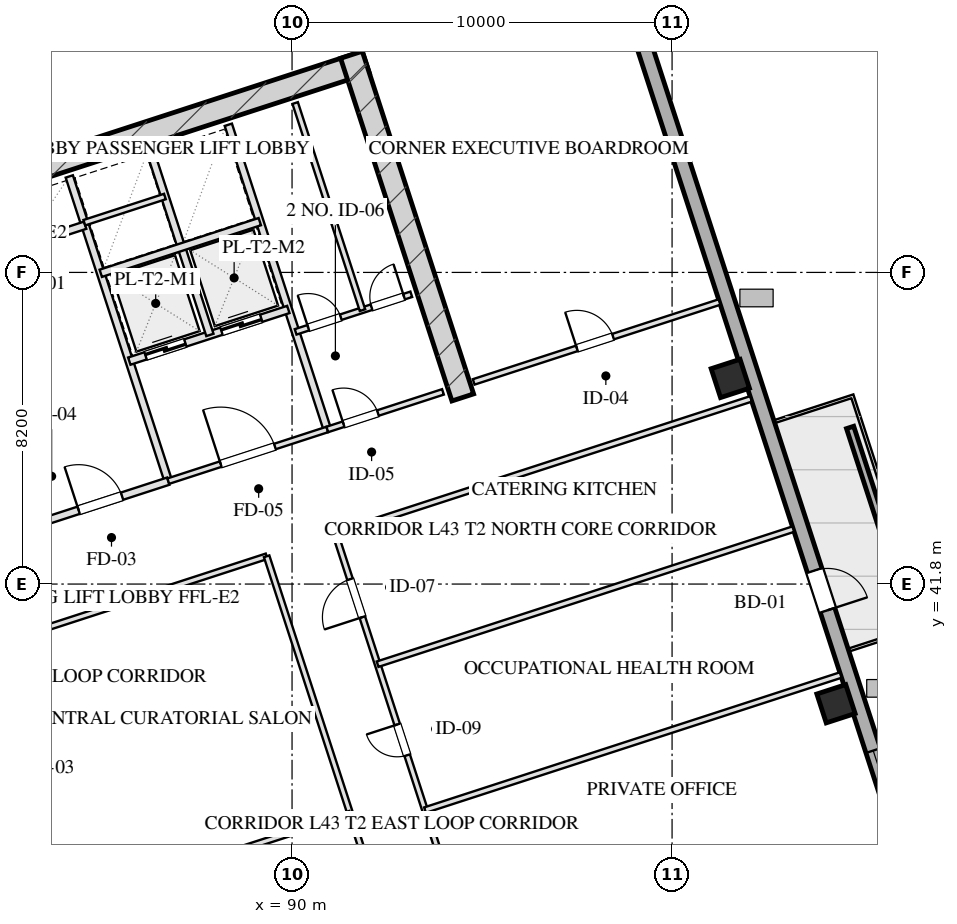
"""IFC4 building model, lengths in metres.
Left out: names, types, materials, properties, quantities, classifications, styles, units other than length and angle.
Written with IfcOpenShell. Run it as: python <this file> out.ifc"""

import sys

from ifc_helpers import new_model, si_unit, direction, frame, frame_2d, origin, origin_2d, place, context, subcontext, project, spatial, rectangle, hollow_rectangle, extrude, element, fill, save


model = new_model("IFC4")
c1 = context("Model", 3, precision=1e-05, world=origin(), true_north=direction((0.0, 1.0)))
c2 = subcontext(c1, "Body", "Model", "MODEL_VIEW")
j1 = project(units=[si_unit("LENGTHUNIT", "METRE"), si_unit("PLANEANGLEUNIT", "RADIAN")], contexts=[c1])
p1 = place(None, origin())
s1 = spatial("IfcSite", under=j1, at=p1, CompositionType="ELEMENT")
p2 = place(p1, origin())
s2 = spatial("IfcBuilding", under=s1, at=p2, CompositionType="ELEMENT")
p3 = place(p2, frame((0.0, 0.0, 163.3)))
s3 = spatial("IfcBuildingStorey", under=s2, at=p3, CompositionType="ELEMENT", Elevation=163.3)
p4 = place(p3, frame((76.344, 50.466, 0.0), z_axis=(0.0, 0.0, 1.0), x_axis=(0.951055727519, 0.309019421968, 0.0)))
e1 = element("IfcWall", 1, at=p4, inside=s3, PredefinedType="SHEAR", context=c2, shape_type="SweptSolid", body=[
    extrude(rectangle(XDim=16.4, YDim=0.6, at=frame_2d((8.2, 0.0))), origin(), (0.0, 0.0, 1.0), 3.45),
])
p5 = place(p3, frame((94.492, 46.71, 0.0), z_axis=(0.0, 0.0, 1.0), x_axis=(-0.309010370028, 0.95105866865, 0.0)))
e2 = element("IfcWall", 2, at=p5, inside=s3, PredefinedType="SHEAR", context=c2, shape_type="SweptSolid", body=[
    extrude(rectangle(XDim=9.48, YDim=0.6, at=frame_2d((4.74, 0.0))), origin(), (0.0, 0.0, 1.0), 3.45),
])
for number, where, z_axis, x_axis in (
    (3, (104.313, 38.651, 0.0), (0.0, 0.0, 1.0), (0.951, 0.309, 0.0)),
    (4, (101.532, 47.21, 0.0), (0.0, 0.0, 1.0), (0.951, 0.309, 0.0)),
):
    element("IfcColumn", number, at=place(p3, frame(where, z_axis=z_axis, x_axis=x_axis)), inside=s3, PredefinedType="COLUMN", context=c2, shape_type="SweptSolid", body=[
        extrude(hollow_rectangle(XDim=0.8, YDim=0.8, WallThickness=0.028, at=origin_2d()), origin(), (0.0, 0.0, 1.0), 3.451),
    ])
p6 = place(p3, frame((70.092, 52.556, 0.0), z_axis=(0.0, 0.0, 1.0), x_axis=(0.951057580055, 0.30901372044, 0.0)))
e5 = element("IfcWall", 5, at=p6, inside=s3, PredefinedType="SOLIDWALL", context=c2, shape_type="SweptSolid", body=[
    extrude(rectangle(XDim=26.4, YDim=0.4, at=frame_2d((13.2, 0.0))), origin(), (0.0, 0.0, 1.0), 2.61),
])
p7 = place(p3, frame((98.224, 59.173, 0.0), z_axis=(0.0, 0.0, 1.0), x_axis=(0.309014228706, -0.951057414911, 0.0)))
e6 = element("IfcWall", 6, at=p7, inside=s3, PredefinedType="SOLIDWALL", context=c2, shape_type="SweptSolid", body=[
    extrude(rectangle(XDim=42.8, YDim=0.4, at=frame_2d((21.4, 0.0))), origin(), (0.0, 0.0, 1.0), 2.61),
])
p8 = place(p7, frame((26.675, 0.0, 0.75)))
e7 = element("IfcOpeningElement", 7, at=p8, cuts=e6, PredefinedType="OPENING", context=c2, shape_type="SweptSolid", body=[
    extrude(rectangle(XDim=2.25, YDim=1.46, at=frame_2d((1.125, 0.73))), frame((0.0, 0.21, 0.0), z_axis=(0.0, -1.0, 0.0), x_axis=(1.0, 0.0, 0.0)), (0.0, 0.0, 1.0), 0.42),
])
p9 = place(p7, frame((22.875, 0.0, 0.75)))
e8 = element("IfcOpeningElement", 8, at=p9, cuts=e6, PredefinedType="OPENING", context=c2, shape_type="SweptSolid", body=[
    extrude(rectangle(XDim=2.25, YDim=1.46, at=frame_2d((1.125, 0.73))), frame((0.0, 0.21, 0.0), z_axis=(0.0, -1.0, 0.0), x_axis=(1.0, 0.0, 0.0)), (0.0, 0.0, 1.0), 0.42),
])
p10 = place(p7, frame((17.892, 0.0, 0.0)))
e9 = element("IfcOpeningElement", 9, at=p10, cuts=e6, PredefinedType="OPENING", context=c2, shape_type="SweptSolid", body=[
    extrude(rectangle(XDim=1.1, YDim=2.15, at=frame_2d((0.55, 1.075))), frame((0.0, 0.21, 0.0), z_axis=(0.0, -1.0, 0.0), x_axis=(1.0, 0.0, 0.0)), (0.0, 0.0, 1.0), 0.42),
])
p11 = place(p3, frame((106.168, 41.356, 0.0), z_axis=(0.0, 0.0, 1.0), x_axis=(-0.309032019345, 0.951051634255, 0.0)))
e10 = element("IfcWall", 10, at=p11, inside=s3, PredefinedType="PARAPET", context=c2, shape_type="SweptSolid", body=[
    extrude(rectangle(XDim=4.8, YDim=0.2, at=frame_2d((2.4, 0.0))), origin(), (0.0, 0.0, 1.0), 0.75),
])
p12 = place(p3, frame((86.743, 44.508, 0.0), z_axis=(0.0, 0.0, 1.0), x_axis=(-0.309016001439, 0.951056838919, 0.0)))
e11 = element("IfcWall", 11, at=p12, inside=s3, PredefinedType="PARTITIONING", context=c2, shape_type="SweptSolid", body=[
    extrude(rectangle(XDim=8.43, YDim=0.2, at=frame_2d((4.215, 0.0))), origin(), (0.0, 0.0, 1.0), 3.175),
])
p13 = place(p3, frame((83.101, 43.324, 0.0), z_axis=(0.0, 0.0, 1.0), x_axis=(0.951052804469, 0.309028417967, 0.0)))
e12 = element("IfcWall", 12, at=p13, inside=s3, PredefinedType="PARTITIONING", context=c2, shape_type="SweptSolid", body=[
    extrude(rectangle(XDim=3.83, YDim=0.2, at=frame_2d((1.915, 0.0))), origin(), (0.0, 0.0, 1.0), 3.175),
])
p14 = place(p13, frame((1.35, 0.0, 0.0)))
e13 = element("IfcOpeningElement", 13, at=p14, cuts=e12, PredefinedType="OPENING", context=c2, shape_type="SweptSolid", body=[
    extrude(rectangle(XDim=1.2, YDim=2.05, at=frame_2d((0.6, 1.025))), frame((0.0, 0.11, 0.0), z_axis=(0.0, -1.0, 0.0), x_axis=(1.0, 0.0, 0.0)), (0.0, 0.0, 1.0), 0.22),
])
p15 = place(p3, frame((82.91, 50.707, 0.0), z_axis=(0.0, 0.0, 1.0), x_axis=(0.951041328149, 0.309063734775, 0.0)))
e14 = element("IfcWall", 14, at=p15, inside=s3, PredefinedType="PARTITIONING", context=c2, shape_type="SweptSolid", body=[
    extrude(rectangle(XDim=1.73, YDim=0.2, at=frame_2d((0.865, 0.0))), origin(), (0.0, 0.0, 1.0), 3.175),
])
p16 = place(p3, frame((90.928, 45.868, 0.0), z_axis=(0.0, 0.0, 1.0), x_axis=(-0.309042196757, 0.951048327176, 0.0)))
e15 = element("IfcWall", 15, at=p16, inside=s3, PredefinedType="PARTITIONING", context=c2, shape_type="SweptSolid", body=[
    extrude(rectangle(XDim=8.43, YDim=0.2, at=frame_2d((4.215, 0.0))), origin(), (0.0, 0.0, 1.0), 3.175),
])
p17 = place(p3, frame((86.743, 44.508, 0.0), z_axis=(0.0, 0.0, 1.0), x_axis=(0.951063829732, 0.308994485023, 0.0)))
e16 = element("IfcWall", 16, at=p17, inside=s3, PredefinedType="PARTITIONING", context=c2, shape_type="SweptSolid", body=[
    extrude(rectangle(XDim=4.4, YDim=0.15, at=frame_2d((2.2, 0.0))), origin(), (0.0, 0.0, 1.0), 3.175),
])
p18 = place(p17, frame((1.45, 0.0, 0.0)))
e17 = element("IfcOpeningElement", 17, at=p18, cuts=e16, PredefinedType="OPENING", context=c2, shape_type="SweptSolid", body=[
    extrude(rectangle(XDim=1.5, YDim=2.05, at=frame_2d((0.75, 1.025))), frame((0.0, 0.085, 0.0), z_axis=(0.0, -1.0, 0.0), x_axis=(1.0, 0.0, 0.0)), (0.0, 0.0, 1.0), 0.17),
])
p19 = place(p3, frame((85.718, 47.666, 0.0), z_axis=(0.0, 0.0, 1.0), x_axis=(0.951058531764, 0.30901079133, 0.0)))
e18 = element("IfcWall", 18, at=p19, inside=s3, PredefinedType="PARTITIONING", context=c2, shape_type="SweptSolid", body=[
    extrude(rectangle(XDim=4.4, YDim=0.2, at=frame_2d((2.2, 0.0))), origin(), (0.0, 0.0, 1.0), 3.175),
])
p20 = place(p19, frame((0.45, 0.0, 0.0)))
e19 = element("IfcOpeningElement", 19, at=p20, cuts=e18, PredefinedType="OPENING", context=c2, shape_type="SweptSolid", body=[
    extrude(rectangle(XDim=1.1, YDim=2.05, at=frame_2d((0.55, 1.025))), frame((0.0, 0.11, 0.0), z_axis=(0.0, -1.0, 0.0), x_axis=(1.0, 0.0, 0.0)), (0.0, 0.0, 1.0), 0.22),
])
p21 = place(p19, frame((2.55, 0.0, 0.0)))
e20 = element("IfcOpeningElement", 20, at=p21, cuts=e18, PredefinedType="OPENING", context=c2, shape_type="SweptSolid", body=[
    extrude(rectangle(XDim=1.1, YDim=2.05, at=frame_2d((0.55, 1.025))), frame((0.0, 0.11, 0.0), z_axis=(0.0, -1.0, 0.0), x_axis=(1.0, 0.0, 0.0)), (0.0, 0.0, 1.0), 0.22),
])
p22 = place(p3, frame((87.838, 48.354, 0.0), z_axis=(0.0, 0.0, 1.0), x_axis=(-0.3090093719, 0.951058992953, 0.0)))
e21 = element("IfcWall", 21, at=p22, inside=s3, PredefinedType="PARTITIONING", context=c2, shape_type="SweptSolid", body=[
    extrude(rectangle(XDim=5.11, YDim=0.2, at=frame_2d((2.555, 0.0))), origin(), (0.0, 0.0, 1.0), 3.175),
])
p23 = place(p3, frame((84.967, 49.977, 0.0), z_axis=(0.0, 0.0, 1.0), x_axis=(0.951063829732, 0.308994485023, 0.0)))
e22 = element("IfcWall", 22, at=p23, inside=s3, PredefinedType="PARTITIONING", context=c2, shape_type="SweptSolid", body=[
    extrude(rectangle(XDim=4.4, YDim=0.2, at=frame_2d((2.2, 0.0))), origin(), (0.0, 0.0, 1.0), 3.175),
])
p24 = place(p3, frame((84.534, 51.308, 0.0), z_axis=(0.0, 0.0, 1.0), x_axis=(0.951075093106, 0.308959814982, 0.0)))
e23 = element("IfcWall", 23, at=p24, inside=s3, PredefinedType="PARTITIONING", context=c2, shape_type="SweptSolid", body=[
    extrude(rectangle(XDim=2.23, YDim=0.15, at=frame_2d((1.115, 0.0))), origin(), (0.0, 0.0, 1.0), 3.175),
])
p25 = place(p3, frame((90.928, 45.868, 0.0), z_axis=(0.0, 0.0, 1.0), x_axis=(0.951059297078, 0.309008435874, 0.0)))
e24 = element("IfcWall", 24, at=p25, inside=s3, PredefinedType="PARTITIONING", context=c2, shape_type="SweptSolid", body=[
    extrude(rectangle(XDim=3.2, YDim=0.15, at=frame_2d((1.6, 0.0))), origin(), (0.0, 0.0, 1.0), 3.175),
])
p26 = place(p25, frame((0.45, 0.0, 0.0)))
e25 = element("IfcOpeningElement", 25, at=p26, cuts=e24, PredefinedType="OPENING", context=c2, shape_type="SweptSolid", body=[
    extrude(rectangle(XDim=0.95, YDim=2.05, at=frame_2d((0.475, 1.025))), frame((0.0, 0.085, 0.0), z_axis=(0.0, -1.0, 0.0), x_axis=(1.0, 0.0, 0.0)), (0.0, 0.0, 1.0), 0.17),
])
p27 = place(p3, frame((90.094, 48.436, 0.0), z_axis=(0.0, 0.0, 1.0), x_axis=(0.951066581729, 0.308986014439, 0.0)))
e26 = element("IfcWall", 26, at=p27, inside=s3, PredefinedType="PARTITIONING", context=c2, shape_type="SweptSolid", body=[
    extrude(rectangle(XDim=3.2, YDim=0.15, at=frame_2d((1.6, 0.0))), origin(), (0.0, 0.0, 1.0), 3.175),
])
p28 = place(p27, frame((0.35, 0.0, 0.0)))
e27 = element("IfcOpeningElement", 27, at=p28, cuts=e26, PredefinedType="OPENING", context=c2, shape_type="SweptSolid", body=[
    extrude(rectangle(XDim=0.9, YDim=2.05, at=frame_2d((0.45, 1.025))), frame((0.0, 0.085, 0.0), z_axis=(0.0, -1.0, 0.0), x_axis=(1.0, 0.0, 0.0)), (0.0, 0.0, 1.0), 0.17),
])
p29 = place(p27, frame((2.1, 0.0, 0.0)))
e28 = element("IfcOpeningElement", 28, at=p29, cuts=e26, PredefinedType="OPENING", context=c2, shape_type="SweptSolid", body=[
    extrude(rectangle(XDim=0.9, YDim=2.05, at=frame_2d((0.45, 1.025))), frame((0.0, 0.085, 0.0), z_axis=(0.0, -1.0, 0.0), x_axis=(1.0, 0.0, 0.0)), (0.0, 0.0, 1.0), 0.17),
])
p30 = place(p3, frame((91.853, 49.007, 0.0), z_axis=(0.0, 0.0, 1.0), x_axis=(-0.309022487551, 0.951054731437, 0.0)))
e29 = element("IfcWall", 29, at=p30, inside=s3, PredefinedType="PARTITIONING", context=c2, shape_type="SweptSolid", body=[
    extrude(rectangle(XDim=5.73, YDim=0.15, at=frame_2d((2.865, 0.0))), origin(), (0.0, 0.0, 1.0), 3.175),
])
p31 = place(p3, frame((94.78, 47.119, 0.0), z_axis=(0.0, 0.0, 1.0), x_axis=(0.951057811516, 0.309013008068, 0.0)))
e30 = element("IfcWall", 30, at=p31, inside=s3, PredefinedType="PARTITIONING", context=c2, shape_type="SweptSolid", body=[
    extrude(rectangle(XDim=6.8, YDim=0.15, at=frame_2d((3.4, 0.0))), origin(), (0.0, 0.0, 1.0), 3.175),
])
p32 = place(p31, frame((2.856, 0.0, 0.0)))
e31 = element("IfcOpeningElement", 31, at=p32, cuts=e30, PredefinedType="OPENING", context=c2, shape_type="SweptSolid", body=[
    extrude(rectangle(XDim=1.0, YDim=2.05, at=frame_2d((0.5, 1.025))), frame((0.0, 0.085, 0.0), z_axis=(0.0, -1.0, 0.0), x_axis=(1.0, 0.0, 0.0)), (0.0, 0.0, 1.0), 0.17),
])
p33 = place(p3, frame((81.152, 39.873, 0.0), z_axis=(0.0, 0.0, 1.0), x_axis=(0.951057640494, 0.309013534425, 0.0)))
e32 = element("IfcWall", 32, at=p33, inside=s3, PredefinedType="PARTITIONING", context=c2, shape_type="SweptSolid", body=[
    extrude(rectangle(XDim=8.6, YDim=0.15, at=frame_2d((4.3, 0.0))), origin(), (0.0, 0.0, 1.0), 3.175),
])
p34 = place(p3, frame((91.138, 43.118, 0.0), z_axis=(0.0, 0.0, 1.0), x_axis=(0.951054972381, 0.309021746015, 0.0)))
e33 = element("IfcWall", 33, at=p34, inside=s3, PredefinedType="PARTITIONING", context=c2, shape_type="SweptSolid", body=[
    extrude(rectangle(XDim=11.5, YDim=0.15, at=frame_2d((5.75, 0.0))), origin(), (0.0, 0.0, 1.0), 3.175),
])
p35 = place(p3, frame((84.487, 23.46, 0.0), z_axis=(0.0, 0.0, 1.0), x_axis=(-0.30901773025, 0.951056277195, 0.0)))
e34 = element("IfcWall", 34, at=p35, inside=s3, PredefinedType="PARTITIONING", context=c2, shape_type="SweptSolid", body=[
    extrude(rectangle(XDim=16.64, YDim=0.15, at=frame_2d((8.32, 0.0))), origin(), (0.0, 0.0, 1.0), 3.175),
])
p36 = place(p35, frame((1.16, 0.0, 0.0)))
e35 = element("IfcOpeningElement", 35, at=p36, cuts=e34, PredefinedType="OPENING", context=c2, shape_type="SweptSolid", body=[
    extrude(rectangle(XDim=1.0, YDim=2.05, at=frame_2d((0.5, 1.025))), frame((0.0, 0.085, 0.0), z_axis=(0.0, -1.0, 0.0), x_axis=(1.0, 0.0, 0.0)), (0.0, 0.0, 1.0), 0.17),
])
p37 = place(p35, frame((4.72, 0.0, 0.0)))
e36 = element("IfcOpeningElement", 36, at=p37, cuts=e34, PredefinedType="OPENING", context=c2, shape_type="SweptSolid", body=[
    extrude(rectangle(XDim=1.0, YDim=2.05, at=frame_2d((0.5, 1.025))), frame((0.0, 0.085, 0.0), z_axis=(0.0, -1.0, 0.0), x_axis=(1.0, 0.0, 0.0)), (0.0, 0.0, 1.0), 0.17),
])
p38 = place(p35, frame((7.56, 0.0, 0.0)))
e37 = element("IfcOpeningElement", 37, at=p38, cuts=e34, PredefinedType="OPENING", context=c2, shape_type="SweptSolid", body=[
    extrude(rectangle(XDim=1.0, YDim=2.05, at=frame_2d((0.5, 1.025))), frame((0.0, 0.085, 0.0), z_axis=(0.0, -1.0, 0.0), x_axis=(1.0, 0.0, 0.0)), (0.0, 0.0, 1.0), 0.17),
])
p39 = place(p35, frame((10.16, 0.0, 0.0)))
e38 = element("IfcOpeningElement", 38, at=p39, cuts=e34, PredefinedType="OPENING", context=c2, shape_type="SweptSolid", body=[
    extrude(rectangle(XDim=1.05, YDim=2.05, at=frame_2d((0.525, 1.025))), frame((0.0, 0.085, 0.0), z_axis=(0.0, -1.0, 0.0), x_axis=(1.0, 0.0, 0.0)), (0.0, 0.0, 1.0), 0.17),
])
p40 = place(p35, frame((14.48, 0.0, 0.0)))
e39 = element("IfcOpeningElement", 39, at=p40, cuts=e34, PredefinedType="OPENING", context=c2, shape_type="SweptSolid", body=[
    extrude(rectangle(XDim=1.0, YDim=2.05, at=frame_2d((0.5, 1.025))), frame((0.0, 0.085, 0.0), z_axis=(0.0, -1.0, 0.0), x_axis=(1.0, 0.0, 0.0)), (0.0, 0.0, 1.0), 0.17),
])
p41 = place(p3, frame((86.294, 24.048, 0.0), z_axis=(0.0, 0.0, 1.0), x_axis=(-0.309004459387, 0.951060589068, 0.0)))
e40 = element("IfcWall", 40, at=p41, inside=s3, PredefinedType="PARTITIONING", context=c2, shape_type="SweptSolid", body=[
    extrude(rectangle(XDim=16.64, YDim=0.15, at=frame_2d((8.32, 0.0))), origin(), (0.0, 0.0, 1.0), 3.175),
])
p42 = place(p41, frame((4.284, 0.0, 0.0)))
e41 = element("IfcOpeningElement", 41, at=p42, cuts=e40, PredefinedType="OPENING", context=c2, shape_type="SweptSolid", body=[
    extrude(rectangle(XDim=1.1, YDim=2.05, at=frame_2d((0.55, 1.025))), frame((0.0, 0.085, 0.0), z_axis=(0.0, -1.0, 0.0), x_axis=(1.0, 0.0, 0.0)), (0.0, 0.0, 1.0), 0.17),
])
p43 = place(p41, frame((12.724, 0.0, 0.0)))
e42 = element("IfcOpeningElement", 42, at=p43, cuts=e40, PredefinedType="OPENING", context=c2, shape_type="SweptSolid", body=[
    extrude(rectangle(XDim=1.1, YDim=2.05, at=frame_2d((0.55, 1.025))), frame((0.0, 0.085, 0.0), z_axis=(0.0, -1.0, 0.0), x_axis=(1.0, 0.0, 0.0)), (0.0, 0.0, 1.0), 0.17),
])
p44 = place(p3, frame((94.473, 26.705, 0.0), z_axis=(0.0, 0.0, 1.0), x_axis=(-0.309022042254, 0.951054876125, 0.0)))
e43 = element("IfcWall", 43, at=p44, inside=s3, PredefinedType="PARTITIONING", context=c2, shape_type="SweptSolid", body=[
    extrude(rectangle(XDim=16.64, YDim=0.15, at=frame_2d((8.32, 0.0))), origin(), (0.0, 0.0, 1.0), 3.175),
])
p45 = place(p3, frame((96.28, 27.292, 0.0), z_axis=(0.0, 0.0, 1.0), x_axis=(-0.309008771245, 0.951059188113, 0.0)))
e44 = element("IfcWall", 44, at=p45, inside=s3, PredefinedType="PARTITIONING", context=c2, shape_type="SweptSolid", body=[
    extrude(rectangle(XDim=16.64, YDim=0.15, at=frame_2d((8.32, 0.0))), origin(), (0.0, 0.0, 1.0), 3.175),
])
p46 = place(p45, frame((1.526, 0.0, 0.0)))
e45 = element("IfcOpeningElement", 45, at=p46, cuts=e44, PredefinedType="OPENING", context=c2, shape_type="SweptSolid", body=[
    extrude(rectangle(XDim=1.0, YDim=2.05, at=frame_2d((0.5, 1.025))), frame((0.0, 0.085, 0.0), z_axis=(0.0, -1.0, 0.0), x_axis=(1.0, 0.0, 0.0)), (0.0, 0.0, 1.0), 0.17),
])
p47 = place(p45, frame((6.026, 0.0, 0.0)))
e46 = element("IfcOpeningElement", 46, at=p47, cuts=e44, PredefinedType="OPENING", context=c2, shape_type="SweptSolid", body=[
    extrude(rectangle(XDim=1.0, YDim=2.05, at=frame_2d((0.5, 1.025))), frame((0.0, 0.085, 0.0), z_axis=(0.0, -1.0, 0.0), x_axis=(1.0, 0.0, 0.0)), (0.0, 0.0, 1.0), 0.17),
])
p48 = place(p45, frame((10.519, 0.0, 0.0)))
e47 = element("IfcOpeningElement", 47, at=p48, cuts=e44, PredefinedType="OPENING", context=c2, shape_type="SweptSolid", body=[
    extrude(rectangle(XDim=0.85, YDim=2.05, at=frame_2d((0.425, 1.025))), frame((0.0, 0.085, 0.0), z_axis=(0.0, -1.0, 0.0), x_axis=(1.0, 0.0, 0.0)), (0.0, 0.0, 1.0), 0.17),
])
p49 = place(p45, frame((14.338, 0.0, 0.0)))
e48 = element("IfcOpeningElement", 48, at=p49, cuts=e44, PredefinedType="OPENING", context=c2, shape_type="SweptSolid", body=[
    extrude(rectangle(XDim=1.05, YDim=2.05, at=frame_2d((0.525, 1.025))), frame((0.0, 0.085, 0.0), z_axis=(0.0, -1.0, 0.0), x_axis=(1.0, 0.0, 0.0)), (0.0, 0.0, 1.0), 0.17),
])
p50 = place(p3, frame((83.352, 33.102, 0.0), z_axis=(0.0, 0.0, 1.0), x_axis=(0.951057640494, 0.309013534425, 0.0)))
e49 = element("IfcWall", 49, at=p50, inside=s3, PredefinedType="PARTITIONING", context=c2, shape_type="SweptSolid", body=[
    extrude(rectangle(XDim=8.6, YDim=0.15, at=frame_2d((4.3, 0.0))), origin(), (0.0, 0.0, 1.0), 3.175),
])
p51 = place(p3, frame((93.499, 35.852, 0.0), z_axis=(0.0, 0.0, 1.0), x_axis=(0.951054972381, 0.309021746015, 0.0)))
e50 = element("IfcWall", 50, at=p51, inside=s3, PredefinedType="PARTITIONING", context=c2, shape_type="SweptSolid", body=[
    extrude(rectangle(XDim=11.5, YDim=0.15, at=frame_2d((5.75, 0.0))), origin(), (0.0, 0.0, 1.0), 3.175),
])
p52 = place(p3, frame((92.251, 39.691, 0.0), z_axis=(0.0, 0.0, 1.0), x_axis=(0.951063238644, 0.308996304347, 0.0)))
e51 = element("IfcWall", 51, at=p52, inside=s3, PredefinedType="PARTITIONING", context=c2, shape_type="SweptSolid", body=[
    extrude(rectangle(XDim=11.5, YDim=0.15, at=frame_2d((5.75, 0.0))), origin(), (0.0, 0.0, 1.0), 3.175),
])
p53 = place(p9, origin())
e52 = element("IfcWindow", 52, at=p53, inside=s3, PartitioningType="TRIPLE_PANEL_VERTICAL", PredefinedType="WINDOW", context=c2, shape_type="SweptSolid", body=[
    extrude(rectangle(XDim=2.25, YDim=1.46, at=frame_2d((1.125, 0.73))), frame((0.0, 0.03, 0.0), z_axis=(0.0, -1.0, 0.0), x_axis=(1.0, 0.0, 0.0)), (0.0, 0.0, 1.0), 0.06),
])
fill(e8, e52)
p54 = place(p10, origin())
e53 = element("IfcDoor", 53, at=p54, inside=s3, OperationType="SINGLE_SWING_RIGHT", PredefinedType="DOOR", context=c2, shape_type="SweptSolid", body=[
    extrude(rectangle(XDim=1.1, YDim=2.15, at=frame_2d((0.55, 1.075))), frame((0.0, 0.025, 0.0), z_axis=(0.0, -1.0, 0.0), x_axis=(1.0, 0.0, 0.0)), (0.0, 0.0, 1.0), 0.05),
])
fill(e9, e53)
p55 = place(p14, origin())
e54 = element("IfcDoor", 54, at=p55, inside=s3, OperationType="SINGLE_SWING_LEFT", PredefinedType="DOOR", context=c2, shape_type="SweptSolid", body=[
    extrude(rectangle(XDim=1.2, YDim=2.05, at=frame_2d((0.6, 1.025))), frame((0.0, 0.025, 0.0), z_axis=(0.0, -1.0, 0.0), x_axis=(1.0, 0.0, 0.0)), (0.0, 0.0, 1.0), 0.05),
])
fill(e13, e54)
p56 = place(p18, origin())
e55 = element("IfcDoor", 55, at=p56, inside=s3, OperationType="SINGLE_SWING_LEFT", PredefinedType="DOOR", context=c2, shape_type="SweptSolid", body=[
    extrude(rectangle(XDim=1.5, YDim=2.05, at=frame_2d((0.75, 1.025))), frame((0.0, 0.025, 0.0), z_axis=(0.0, -1.0, 0.0), x_axis=(1.0, 0.0, 0.0)), (0.0, 0.0, 1.0), 0.05),
])
fill(e17, e55)
p57 = place(p20, origin())
e56 = element("IfcDoor", 56, at=p57, inside=s3, OperationType="DOUBLE_DOOR_SLIDING", PredefinedType="DOOR", context=c2, shape_type="SweptSolid", body=[
    extrude(rectangle(XDim=1.1, YDim=2.05, at=frame_2d((0.55, 1.025))), frame((0.0, 0.025, 0.0), z_axis=(0.0, -1.0, 0.0), x_axis=(1.0, 0.0, 0.0)), (0.0, 0.0, 1.0), 0.05),
])
fill(e19, e56)
p58 = place(p21, origin())
e57 = element("IfcDoor", 57, at=p58, inside=s3, OperationType="DOUBLE_DOOR_SLIDING", PredefinedType="DOOR", context=c2, shape_type="SweptSolid", body=[
    extrude(rectangle(XDim=1.1, YDim=2.05, at=frame_2d((0.55, 1.025))), frame((0.0, 0.025, 0.0), z_axis=(0.0, -1.0, 0.0), x_axis=(1.0, 0.0, 0.0)), (0.0, 0.0, 1.0), 0.05),
])
fill(e20, e57)
p59 = place(p26, origin())
e58 = element("IfcDoor", 58, at=p59, inside=s3, OperationType="SINGLE_SWING_LEFT", PredefinedType="DOOR", context=c2, shape_type="SweptSolid", body=[
    extrude(rectangle(XDim=0.95, YDim=2.05, at=frame_2d((0.475, 1.025))), frame((0.0, 0.025, 0.0), z_axis=(0.0, -1.0, 0.0), x_axis=(1.0, 0.0, 0.0)), (0.0, 0.0, 1.0), 0.05),
])
fill(e25, e58)
p60 = place(p28, origin())
e59 = element("IfcDoor", 59, at=p60, inside=s3, OperationType="SINGLE_SWING_LEFT", PredefinedType="DOOR", context=c2, shape_type="SweptSolid", body=[
    extrude(rectangle(XDim=0.9, YDim=2.05, at=frame_2d((0.45, 1.025))), frame((0.0, 0.025, 0.0), z_axis=(0.0, -1.0, 0.0), x_axis=(1.0, 0.0, 0.0)), (0.0, 0.0, 1.0), 0.05),
])
fill(e27, e59)
p61 = place(p29, origin())
e60 = element("IfcDoor", 60, at=p61, inside=s3, OperationType="SINGLE_SWING_RIGHT", PredefinedType="DOOR", context=c2, shape_type="SweptSolid", body=[
    extrude(rectangle(XDim=0.9, YDim=2.05, at=frame_2d((0.45, 1.025))), frame((0.0, 0.025, 0.0), z_axis=(0.0, -1.0, 0.0), x_axis=(1.0, 0.0, 0.0)), (0.0, 0.0, 1.0), 0.05),
])
fill(e28, e60)
p62 = place(p32, origin())
e61 = element("IfcDoor", 61, at=p62, inside=s3, OperationType="SINGLE_SWING_LEFT", PredefinedType="DOOR", context=c2, shape_type="SweptSolid", body=[
    extrude(rectangle(XDim=1.0, YDim=2.05, at=frame_2d((0.5, 1.025))), frame((0.0, 0.025, 0.0), z_axis=(0.0, -1.0, 0.0), x_axis=(1.0, 0.0, 0.0)), (0.0, 0.0, 1.0), 0.05),
])
fill(e31, e61)
p63 = place(p48, origin())
e62 = element("IfcDoor", 62, at=p63, inside=s3, OperationType="SINGLE_SWING_RIGHT", PredefinedType="DOOR", context=c2, shape_type="SweptSolid", body=[
    extrude(rectangle(XDim=0.85, YDim=2.05, at=frame_2d((0.425, 1.025))), frame((0.0, 0.025, 0.0), z_axis=(0.0, -1.0, 0.0), x_axis=(1.0, 0.0, 0.0)), (0.0, 0.0, 1.0), 0.05),
])
fill(e47, e62)
p64 = place(p49, origin())
e63 = element("IfcDoor", 63, at=p64, inside=s3, OperationType="SINGLE_SWING_LEFT", PredefinedType="DOOR", context=c2, shape_type="SweptSolid", body=[
    extrude(rectangle(XDim=1.05, YDim=2.05, at=frame_2d((0.525, 1.025))), frame((0.0, 0.025, 0.0), z_axis=(0.0, -1.0, 0.0), x_axis=(1.0, 0.0, 0.0)), (0.0, 0.0, 1.0), 0.05),
])
fill(e48, e63)
save(model, sys.argv[1])
